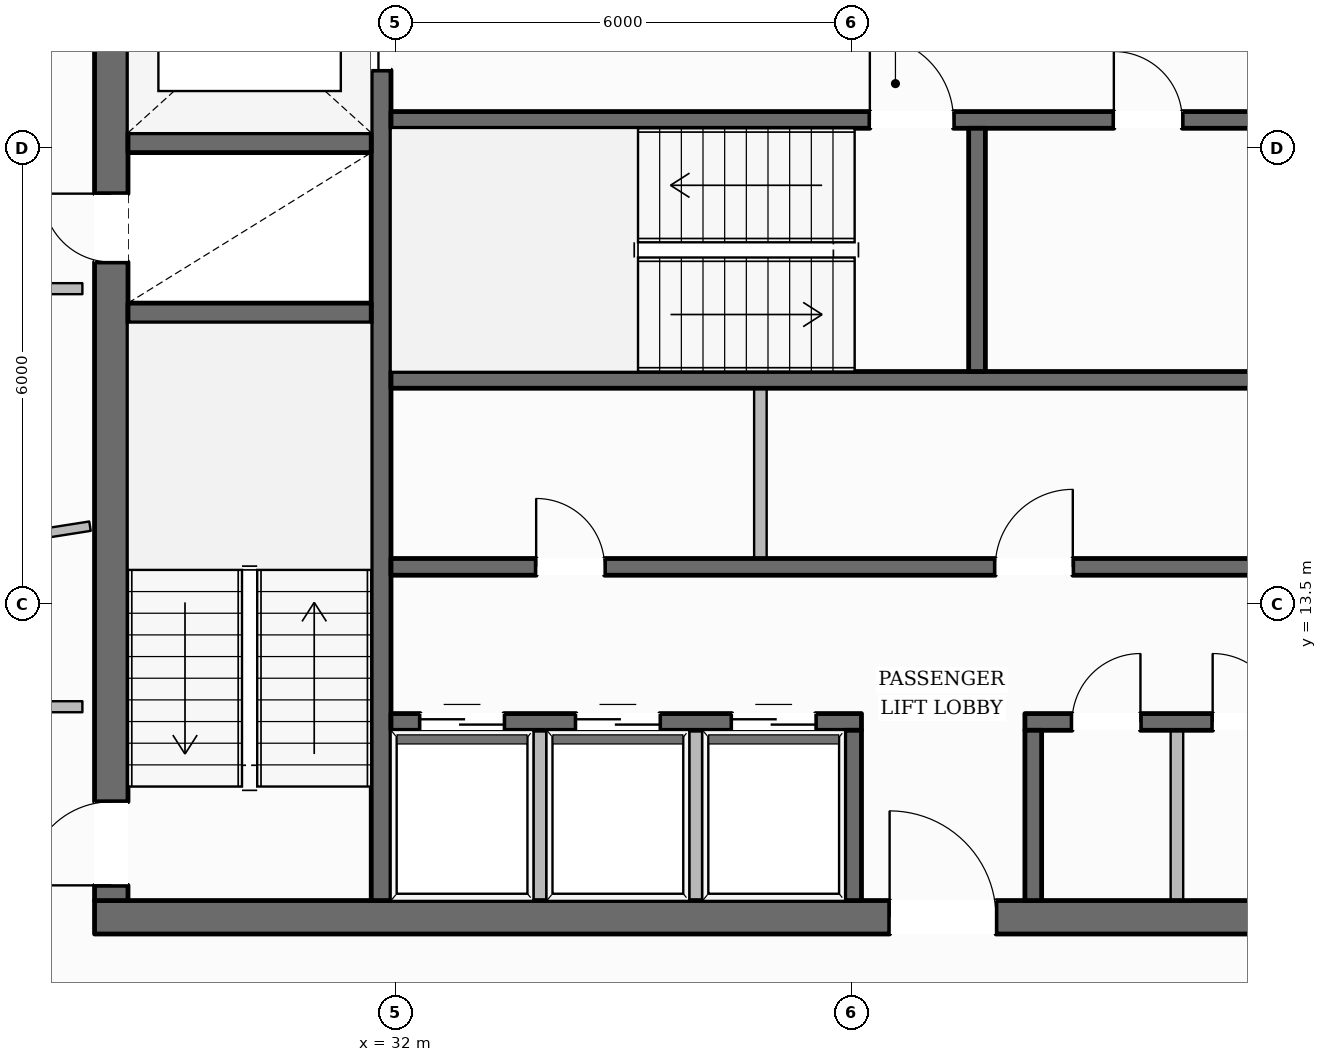
"""IFC4 building model, lengths in metres.
Left out: names, types, materials, properties, quantities, classifications, styles, units other than length and angle.
Written with IfcOpenShell. Run it as: python <this file> out.ifc"""

import sys

from ifc_helpers import new_model, si_unit, direction, frame, frame_2d, origin, place, context, subcontext, project, spatial, rectangle, extrude, element, fill, save


model = new_model("IFC4")
c1 = context("Model", 3, precision=1e-05, world=origin(), true_north=direction((0.0, 1.0)))
c2 = subcontext(c1, "Body", "Model", "MODEL_VIEW")
j1 = project(units=[si_unit("LENGTHUNIT", "METRE"), si_unit("PLANEANGLEUNIT", "RADIAN")], contexts=[c1])
p1 = place(None, origin())
s1 = spatial("IfcSite", under=j1, at=p1, CompositionType="ELEMENT")
p2 = place(p1, origin())
s2 = spatial("IfcBuilding", under=s1, at=p2, CompositionType="ELEMENT")
p3 = place(p2, frame((0.0, 0.0, 168.85)))
s3 = spatial("IfcBuildingStorey", under=s2, at=p3, CompositionType="ELEMENT", Elevation=168.85)
p4 = place(p3, frame((28.04, 9.38, 0.0), z_axis=(0.0, 0.0, 1.0), x_axis=(1.0, 0.0, 0.0)))
e1 = element("IfcWall", 1, at=p4, inside=s3, PredefinedType="SOLIDWALL", context=c2, shape_type="SweptSolid", body=[
    extrude(rectangle(XDim=19.92, YDim=0.44, at=frame_2d((9.96, 0.0))), origin(), (0.0, 0.0, 1.0), 3.6),
])
p5 = place(p4, frame((10.46, 0.0, 0.0)))
e2 = element("IfcOpeningElement", 2, at=p5, cuts=e1, PredefinedType="OPENING", context=c2, shape_type="SweptSolid", body=[
    extrude(rectangle(XDim=1.4, YDim=2.2, at=frame_2d((0.7, 1.1))), frame((0.0, 0.23, 0.0), z_axis=(0.0, -1.0, 0.0), x_axis=(1.0, 0.0, 0.0)), (0.0, 0.0, 1.0), 0.46),
])
p6 = place(p3, frame((28.26, 9.6, 0.0), z_axis=(0.0, 0.0, 1.0), x_axis=(0.0, 1.0, 0.0)))
e3 = element("IfcWall", 3, at=p6, inside=s3, PredefinedType="SOLIDWALL", context=c2, shape_type="SweptSolid", body=[
    extrude(rectangle(XDim=13.0, YDim=0.44, at=frame_2d((6.5, 0.0))), origin(), (0.0, 0.0, 1.0), 3.6),
])
p7 = place(p6, frame((0.2, 0.0, 0.0)))
e4 = element("IfcOpeningElement", 4, at=p7, cuts=e3, PredefinedType="OPENING", context=c2, shape_type="SweptSolid", body=[
    extrude(rectangle(XDim=1.1, YDim=2.15, at=frame_2d((0.55, 1.075))), frame((0.0, 0.23, 0.0), z_axis=(0.0, -1.0, 0.0), x_axis=(1.0, 0.0, 0.0)), (0.0, 0.0, 1.0), 0.46),
])
p8 = place(p6, frame((8.4, 0.0, 0.0)))
e5 = element("IfcOpeningElement", 5, at=p8, cuts=e3, PredefinedType="OPENING", context=c2, shape_type="SweptSolid", body=[
    extrude(rectangle(XDim=0.9, YDim=2.1, at=frame_2d((0.45, 1.05))), frame((0.0, 0.23, 0.0), z_axis=(0.0, -1.0, 0.0), x_axis=(1.0, 0.0, 0.0)), (0.0, 0.0, 1.0), 0.46),
])
p9 = place(p3, frame((31.81, 9.6, 0.0), z_axis=(0.0, 0.0, 1.0), x_axis=(0.0, 1.0, 0.0)))
e6 = element("IfcWall", 6, at=p9, inside=s3, PredefinedType="SHEAR", context=c2, shape_type="SweptSolid", body=[
    extrude(rectangle(XDim=13.0, YDim=0.26, at=frame_2d((6.5, 0.0))), origin(), (0.0, 0.0, 1.0), 3.6),
])
p10 = place(p9, frame((10.925, 0.0, 0.0)))
e7 = element("IfcOpeningElement", 7, at=p10, cuts=e6, PredefinedType="OPENING", context=c2, shape_type="SweptSolid", body=[
    extrude(rectangle(XDim=1.25, YDim=2.25, at=frame_2d((0.625, 1.125))), frame((0.0, 0.14, 0.0), z_axis=(0.0, -1.0, 0.0), x_axis=(1.0, 0.0, 0.0)), (0.0, 0.0, 1.0), 0.28),
])
for number, where, z_axis, x_axis in (
    (8, (28.48, 17.33, 0.0), (0.0, 0.0, 1.0), (1.0, 0.0, 0.0)),
    (9, (28.48, 19.57, 0.0), (0.0, 0.0, 1.0), (1.0, 0.0, 0.0)),
):
    element("IfcWall", number, at=place(p3, frame(where, z_axis=z_axis, x_axis=x_axis)), inside=s3, PredefinedType="SHEAR", context=c2, shape_type="SweptSolid", body=[
        extrude(rectangle(XDim=3.2, YDim=0.26, at=frame_2d((1.6, 0.0))), origin(), (0.0, 0.0, 1.0), 3.6),
    ])
p11 = place(p3, frame((31.94, 19.87, 0.0), z_axis=(0.0, 0.0, 1.0), x_axis=(1.0, 0.0, 0.0)))
e10 = element("IfcWall", 10, at=p11, inside=s3, PredefinedType="SOLIDWALL", context=c2, shape_type="SweptSolid", body=[
    extrude(rectangle(XDim=12.12, YDim=0.22, at=frame_2d((6.06, 0.0))), origin(), (0.0, 0.0, 1.0), 3.6),
])
p12 = place(p11, frame((6.3, 0.0, 0.0)))
e11 = element("IfcOpeningElement", 11, at=p12, cuts=e10, PredefinedType="OPENING", context=c2, shape_type="SweptSolid", body=[
    extrude(rectangle(XDim=1.1, YDim=2.15, at=frame_2d((0.55, 1.075))), frame((0.0, 0.12, 0.0), z_axis=(0.0, -1.0, 0.0), x_axis=(1.0, 0.0, 0.0)), (0.0, 0.0, 1.0), 0.24),
])
p13 = place(p11, frame((9.51, 0.0, 0.0)))
e12 = element("IfcOpeningElement", 12, at=p13, cuts=e10, PredefinedType="OPENING", context=c2, shape_type="SweptSolid", body=[
    extrude(rectangle(XDim=0.9, YDim=2.1, at=frame_2d((0.45, 1.05))), frame((0.0, 0.12, 0.0), z_axis=(0.0, -1.0, 0.0), x_axis=(1.0, 0.0, 0.0)), (0.0, 0.0, 1.0), 0.24),
])
p14 = place(p3, frame((31.94, 16.45, 0.0), z_axis=(0.0, 0.0, 1.0), x_axis=(1.0, 0.0, 0.0)))
e13 = element("IfcWall", 13, at=p14, inside=s3, PredefinedType="SOLIDWALL", context=c2, shape_type="SweptSolid", body=[
    extrude(rectangle(XDim=12.12, YDim=0.22, at=frame_2d((6.06, 0.0))), origin(), (0.0, 0.0, 1.0), 3.6),
])
p15 = place(p3, frame((39.65, 16.56, 0.0), z_axis=(0.0, 0.0, 1.0), x_axis=(0.0, 1.0, 0.0)))
e14 = element("IfcWall", 14, at=p15, inside=s3, PredefinedType="SOLIDWALL", context=c2, shape_type="SweptSolid", body=[
    extrude(rectangle(XDim=3.2, YDim=0.22, at=frame_2d((1.6, 0.0))), origin(), (0.0, 0.0, 1.0), 3.6),
])
p16 = place(p3, frame((31.94, 13.99, 0.0), z_axis=(0.0, 0.0, 1.0), x_axis=(1.0, 0.0, 0.0)))
e15 = element("IfcWall", 15, at=p16, inside=s3, PredefinedType="SOLIDWALL", context=c2, shape_type="SweptSolid", body=[
    extrude(rectangle(XDim=12.12, YDim=0.22, at=frame_2d((6.06, 0.0))), origin(), (0.0, 0.0, 1.0), 3.6),
])
p17 = place(p16, frame((1.91, 0.0, 0.0)))
e16 = element("IfcOpeningElement", 16, at=p17, cuts=e15, PredefinedType="OPENING", context=c2, shape_type="SweptSolid", body=[
    extrude(rectangle(XDim=0.9, YDim=2.1, at=frame_2d((0.45, 1.05))), frame((0.0, 0.12, 0.0), z_axis=(0.0, -1.0, 0.0), x_axis=(1.0, 0.0, 0.0)), (0.0, 0.0, 1.0), 0.24),
])
p18 = place(p16, frame((7.95, 0.0, 0.0)))
e17 = element("IfcOpeningElement", 17, at=p18, cuts=e15, PredefinedType="OPENING", context=c2, shape_type="SweptSolid", body=[
    extrude(rectangle(XDim=1.02, YDim=2.15, at=frame_2d((0.51, 1.075))), frame((0.0, 0.12, 0.0), z_axis=(0.0, -1.0, 0.0), x_axis=(1.0, 0.0, 0.0)), (0.0, 0.0, 1.0), 0.24),
])
p19 = place(p3, frame((31.94, 11.95, 0.0), z_axis=(0.0, 0.0, 1.0), x_axis=(1.0, 0.0, 0.0)))
e18 = element("IfcWall", 18, at=p19, inside=s3, PredefinedType="SOLIDWALL", context=c2, shape_type="SweptSolid", body=[
    extrude(rectangle(XDim=6.19, YDim=0.22, at=frame_2d((3.095, 0.0))), origin(), (0.0, 0.0, 1.0), 3.6),
])
p20 = place(p19, frame((0.385, 0.0, 0.0)))
e19 = element("IfcOpeningElement", 19, at=p20, cuts=e18, PredefinedType="OPENING", context=c2, shape_type="SweptSolid", body=[
    extrude(rectangle(XDim=1.1, YDim=2.2, at=frame_2d((0.55, 1.1))), frame((0.0, 0.12, 0.0), z_axis=(0.0, -1.0, 0.0), x_axis=(1.0, 0.0, 0.0)), (0.0, 0.0, 1.0), 0.24),
])
p21 = place(p19, frame((2.435, 0.0, 0.0)))
e20 = element("IfcOpeningElement", 20, at=p21, cuts=e18, PredefinedType="OPENING", context=c2, shape_type="SweptSolid", body=[
    extrude(rectangle(XDim=1.1, YDim=2.2, at=frame_2d((0.55, 1.1))), frame((0.0, 0.12, 0.0), z_axis=(0.0, -1.0, 0.0), x_axis=(1.0, 0.0, 0.0)), (0.0, 0.0, 1.0), 0.24),
])
p22 = place(p19, frame((4.485, 0.0, 0.0)))
e21 = element("IfcOpeningElement", 21, at=p22, cuts=e18, PredefinedType="OPENING", context=c2, shape_type="SweptSolid", body=[
    extrude(rectangle(XDim=1.1, YDim=2.2, at=frame_2d((0.55, 1.1))), frame((0.0, 0.12, 0.0), z_axis=(0.0, -1.0, 0.0), x_axis=(1.0, 0.0, 0.0)), (0.0, 0.0, 1.0), 0.24),
])
p23 = place(p3, frame((40.28, 11.95, 0.0), z_axis=(0.0, 0.0, 1.0), x_axis=(1.0, 0.0, 0.0)))
e22 = element("IfcWall", 22, at=p23, inside=s3, PredefinedType="SOLIDWALL", context=c2, shape_type="SweptSolid", body=[
    extrude(rectangle(XDim=3.78, YDim=0.22, at=frame_2d((1.89, 0.0))), origin(), (0.0, 0.0, 1.0), 3.6),
])
p24 = place(p23, frame((0.62, 0.0, 0.0)))
e23 = element("IfcOpeningElement", 23, at=p24, cuts=e22, PredefinedType="OPENING", context=c2, shape_type="SweptSolid", body=[
    extrude(rectangle(XDim=0.9, YDim=2.1, at=frame_2d((0.45, 1.05))), frame((0.0, 0.12, 0.0), z_axis=(0.0, -1.0, 0.0), x_axis=(1.0, 0.0, 0.0)), (0.0, 0.0, 1.0), 0.24),
])
p25 = place(p23, frame((2.47, 0.0, 0.0)))
e24 = element("IfcOpeningElement", 24, at=p25, cuts=e22, PredefinedType="OPENING", context=c2, shape_type="SweptSolid", body=[
    extrude(rectangle(XDim=0.9, YDim=2.1, at=frame_2d((0.45, 1.05))), frame((0.0, 0.12, 0.0), z_axis=(0.0, -1.0, 0.0), x_axis=(1.0, 0.0, 0.0)), (0.0, 0.0, 1.0), 0.24),
])
for number, where, z_axis, x_axis in (
    (25, (38.02, 9.6, 0.0), (0.0, 0.0, 1.0), (0.0, 1.0, 0.0)),
    (26, (40.39, 9.6, 0.0), (0.0, 0.0, 1.0), (0.0, 1.0, 0.0)),
):
    element("IfcWall", number, at=place(p3, frame(where, z_axis=z_axis, x_axis=x_axis)), inside=s3, PredefinedType="SOLIDWALL", context=c2, shape_type="SweptSolid", body=[
        extrude(rectangle(XDim=2.24, YDim=0.22, at=frame_2d((1.12, 0.0))), origin(), (0.0, 0.0, 1.0), 3.6),
    ])
p26 = place(p3, frame((15.072, 12.292, 0.0), z_axis=(0.0, 0.0, 1.0), x_axis=(0.492336574501, 0.870404904288, 0.0)))
e27 = element("IfcWall", 27, at=p26, inside=s3, PredefinedType="STANDARD", context=c2, shape_type="SweptSolid", body=[
    extrude(rectangle(XDim=37.15, YDim=0.35, at=frame_2d((18.575, 0.0))), origin(), (0.0, 0.0, 1.0), 3.132),
])
p27 = place(p26, frame((8.888, 0.0, 0.0)))
e28 = element("IfcOpeningElement", 28, at=p27, cuts=e27, PredefinedType="OPENING", context=c2, shape_type="SweptSolid", body=[
    extrude(rectangle(XDim=1.0, YDim=2.2, at=frame_2d((0.5, 1.1))), frame((0.0, 0.185, 0.0), z_axis=(0.0, -1.0, 0.0), x_axis=(1.0, 0.0, 0.0)), (0.0, 0.0, 1.0), 0.37),
])
p28 = place(p26, frame((32.928, 0.0, 0.65)))
e29 = element("IfcOpeningElement", 29, at=p28, cuts=e27, PredefinedType="OPENING", context=c2, shape_type="SweptSolid", body=[
    extrude(rectangle(XDim=1.45, YDim=1.75, at=frame_2d((0.725, 0.875))), frame((0.0, 0.185, 0.0), z_axis=(0.0, -1.0, 0.0), x_axis=(1.0, 0.0, 0.0)), (0.0, 0.0, 1.0), 0.37),
])
p29 = place(p26, frame((26.895, 0.0, 0.65)))
e30 = element("IfcOpeningElement", 30, at=p29, cuts=e27, PredefinedType="OPENING", context=c2, shape_type="SweptSolid", body=[
    extrude(rectangle(XDim=1.45, YDim=1.75, at=frame_2d((0.725, 0.875))), frame((0.0, 0.185, 0.0), z_axis=(0.0, -1.0, 0.0), x_axis=(1.0, 0.0, 0.0)), (0.0, 0.0, 1.0), 0.37),
])
p30 = place(p26, frame((20.862, 0.0, 0.65)))
e31 = element("IfcOpeningElement", 31, at=p30, cuts=e27, PredefinedType="OPENING", context=c2, shape_type="SweptSolid", body=[
    extrude(rectangle(XDim=1.45, YDim=1.75, at=frame_2d((0.725, 0.875))), frame((0.0, 0.185, 0.0), z_axis=(0.0, -1.0, 0.0), x_axis=(1.0, 0.0, 0.0)), (0.0, 0.0, 1.0), 0.37),
])
p31 = place(p26, frame((2.764, 0.0, 0.65)))
e32 = element("IfcOpeningElement", 32, at=p31, cuts=e27, PredefinedType="OPENING", context=c2, shape_type="SweptSolid", body=[
    extrude(rectangle(XDim=1.45, YDim=1.75, at=frame_2d((0.725, 0.875))), frame((0.0, 0.185, 0.0), z_axis=(0.0, -1.0, 0.0), x_axis=(1.0, 0.0, 0.0)), (0.0, 0.0, 1.0), 0.37),
])
p32 = place(p3, frame((42.696, 44.593, 0.0), z_axis=(0.0, 0.0, 1.0), x_axis=(0.495321099056, -0.868709968188, 0.0)))
e33 = element("IfcWall", 33, at=p32, inside=s3, PredefinedType="STANDARD", context=c2, shape_type="SweptSolid", body=[
    extrude(rectangle(XDim=37.366, YDim=0.35, at=frame_2d((18.683, 0.0))), origin(), (0.0, 0.0, 1.0), 3.132),
])
p33 = place(p32, frame((33.134, 0.0, 0.65)))
e34 = element("IfcOpeningElement", 34, at=p33, cuts=e33, PredefinedType="OPENING", context=c2, shape_type="SweptSolid", body=[
    extrude(rectangle(XDim=1.45, YDim=1.75, at=frame_2d((0.725, 0.875))), frame((0.0, 0.185, 0.0), z_axis=(0.0, -1.0, 0.0), x_axis=(1.0, 0.0, 0.0)), (0.0, 0.0, 1.0), 0.37),
])
p34 = place(p32, frame((27.065, 0.0, 0.65)))
e35 = element("IfcOpeningElement", 35, at=p34, cuts=e33, PredefinedType="OPENING", context=c2, shape_type="SweptSolid", body=[
    extrude(rectangle(XDim=1.45, YDim=1.75, at=frame_2d((0.725, 0.875))), frame((0.0, 0.185, 0.0), z_axis=(0.0, -1.0, 0.0), x_axis=(1.0, 0.0, 0.0)), (0.0, 0.0, 1.0), 0.37),
])
p35 = place(p32, frame((20.995, 0.0, 0.65)))
e36 = element("IfcOpeningElement", 36, at=p35, cuts=e33, PredefinedType="OPENING", context=c2, shape_type="SweptSolid", body=[
    extrude(rectangle(XDim=1.45, YDim=1.75, at=frame_2d((0.725, 0.875))), frame((0.0, 0.185, 0.0), z_axis=(0.0, -1.0, 0.0), x_axis=(1.0, 0.0, 0.0)), (0.0, 0.0, 1.0), 0.37),
])
p36 = place(p32, frame((8.857, 0.0, 0.65)))
e37 = element("IfcOpeningElement", 37, at=p36, cuts=e33, PredefinedType="OPENING", context=c2, shape_type="SweptSolid", body=[
    extrude(rectangle(XDim=1.45, YDim=1.75, at=frame_2d((0.725, 0.875))), frame((0.0, 0.185, 0.0), z_axis=(0.0, -1.0, 0.0), x_axis=(1.0, 0.0, 0.0)), (0.0, 0.0, 1.0), 0.37),
])
p37 = place(p32, frame((2.787, 0.0, 0.65)))
e38 = element("IfcOpeningElement", 38, at=p37, cuts=e33, PredefinedType="OPENING", context=c2, shape_type="SweptSolid", body=[
    extrude(rectangle(XDim=1.45, YDim=1.75, at=frame_2d((0.725, 0.875))), frame((0.0, 0.185, 0.0), z_axis=(0.0, -1.0, 0.0), x_axis=(1.0, 0.0, 0.0)), (0.0, 0.0, 1.0), 0.37),
])
for number, where, z_axis, x_axis in (
    (39, (33.9, 9.52, 0.0), (0.0, 0.0, 1.0), (0.0, 1.0, 0.0)),
    (40, (35.95, 9.52, 0.0), (0.0, 0.0, 1.0), (0.0, 1.0, 0.0)),
):
    element("IfcWall", number, at=place(p3, frame(where, z_axis=z_axis, x_axis=x_axis)), inside=s3, PredefinedType="PARTITIONING", context=c2, shape_type="SweptSolid", body=[
        extrude(rectangle(XDim=2.32, YDim=0.165, at=frame_2d((1.16, 0.0))), origin(), (0.0, 0.0, 1.0), 3.6),
    ])
p38 = place(p3, frame((36.8, 14.1, 0.0), z_axis=(0.0, 0.0, 1.0), x_axis=(0.0, 1.0, 0.0)))
e41 = element("IfcWall", 41, at=p38, inside=s3, PredefinedType="PARTITIONING", context=c2, shape_type="SweptSolid", body=[
    extrude(rectangle(XDim=2.24, YDim=0.165, at=frame_2d((1.12, 0.0))), origin(), (0.0, 0.0, 1.0), 3.6),
])
p39 = place(p3, frame((42.28, 9.52, 0.0), z_axis=(0.0, 0.0, 1.0), x_axis=(0.0, 1.0, 0.0)))
e42 = element("IfcWall", 42, at=p39, inside=s3, PredefinedType="PARTITIONING", context=c2, shape_type="SweptSolid", body=[
    extrude(rectangle(XDim=2.32, YDim=0.165, at=frame_2d((1.16, 0.0))), origin(), (0.0, 0.0, 1.0), 3.6),
])
p40 = place(p3, frame((27.88, 17.65, 0.0), z_axis=(0.0, 0.0, 1.0), x_axis=(-1.0, 0.0, 0.0)))
e43 = element("IfcWall", 43, at=p40, inside=s3, PredefinedType="PARTITIONING", context=c2, shape_type="SweptSolid", body=[
    extrude(rectangle(XDim=1.82, YDim=0.145, at=frame_2d((0.91, 0.0))), origin(), (0.0, 0.0, 1.0), 3.141),
])
p41 = place(p3, frame((26.06, 12.15, 0.0), z_axis=(0.0, 0.0, 1.0), x_axis=(1.0, 0.0, 0.0)))
e44 = element("IfcWall", 44, at=p41, inside=s3, PredefinedType="PARTITIONING", context=c2, shape_type="SweptSolid", body=[
    extrude(rectangle(XDim=1.82, YDim=0.145, at=frame_2d((0.91, 0.0))), origin(), (0.0, 0.0, 1.0), 3.6),
])
p42 = place(p3, frame((27.98, 14.525, 0.0), z_axis=(0.0, 0.0, 1.0), x_axis=(-0.987880348001, -0.155217325174, 0.0)))
e45 = element("IfcWall", 45, at=p42, inside=s3, PredefinedType="PARTITIONING", context=c2, shape_type="SweptSolid", body=[
    extrude(rectangle(XDim=12.281, YDim=0.125, at=frame_2d((6.141, 0.0))), origin(), (0.0, 0.0, 1.0), 3.141),
])
p43 = place(p42, frame((7.763, 0.0, 0.0)))
e46 = element("IfcOpeningElement", 46, at=p43, cuts=e45, PredefinedType="OPENING", context=c2, shape_type="SweptSolid", body=[
    extrude(rectangle(XDim=0.98, YDim=2.15, at=frame_2d((0.49, 1.075))), frame((0.0, 0.073, 0.0), z_axis=(0.0, -1.0, 0.0), x_axis=(1.0, 0.0, 0.0)), (0.0, 0.0, 1.0), 0.145),
])
p44 = place(p7, origin())
e47 = element("IfcDoor", 47, at=p44, inside=s3, OperationType="SINGLE_SWING_LEFT", PredefinedType="DOOR", context=c2, shape_type="SweptSolid", body=[
    extrude(rectangle(XDim=1.1, YDim=2.15, at=frame_2d((0.55, 1.075))), frame((0.0, 0.025, 0.0), z_axis=(0.0, -1.0, 0.0), x_axis=(1.0, 0.0, 0.0)), (0.0, 0.0, 1.0), 0.05),
])
fill(e4, e47)
p45 = place(p12, origin())
e48 = element("IfcDoor", 48, at=p45, inside=s3, OperationType="SINGLE_SWING_LEFT", PredefinedType="DOOR", context=c2, shape_type="SweptSolid", body=[
    extrude(rectangle(XDim=1.1, YDim=2.15, at=frame_2d((0.55, 1.075))), frame((0.0, 0.025, 0.0), z_axis=(0.0, -1.0, 0.0), x_axis=(1.0, 0.0, 0.0)), (0.0, 0.0, 1.0), 0.05),
])
fill(e11, e48)
p46 = place(p8, origin())
e49 = element("IfcDoor", 49, at=p46, inside=s3, OperationType="SINGLE_SWING_RIGHT", PredefinedType="DOOR", context=c2, shape_type="SweptSolid", body=[
    extrude(rectangle(XDim=0.9, YDim=2.1, at=frame_2d((0.45, 1.05))), frame((0.0, 0.025, 0.0), z_axis=(0.0, -1.0, 0.0), x_axis=(1.0, 0.0, 0.0)), (0.0, 0.0, 1.0), 0.05),
])
fill(e5, e49)
p47 = place(p10, origin())
e50 = element("IfcDoor", 50, at=p47, inside=s3, OperationType="DOUBLE_DOOR_SLIDING", PredefinedType="DOOR", context=c2, shape_type="SweptSolid", body=[
    extrude(rectangle(XDim=1.25, YDim=2.25, at=frame_2d((0.625, 1.125))), frame((0.0, 0.025, 0.0), z_axis=(0.0, -1.0, 0.0), x_axis=(1.0, 0.0, 0.0)), (0.0, 0.0, 1.0), 0.05),
])
fill(e7, e50)
p48 = place(p5, origin())
e51 = element("IfcDoor", 51, at=p48, inside=s3, OperationType="SINGLE_SWING_LEFT", PredefinedType="DOOR", context=c2, shape_type="SweptSolid", body=[
    extrude(rectangle(XDim=1.4, YDim=2.2, at=frame_2d((0.7, 1.1))), frame((0.0, 0.025, 0.0), z_axis=(0.0, -1.0, 0.0), x_axis=(1.0, 0.0, 0.0)), (0.0, 0.0, 1.0), 0.05),
])
fill(e2, e51)
p49 = place(p20, origin())
e52 = element("IfcDoor", 52, at=p49, inside=s3, OperationType="DOUBLE_DOOR_SLIDING", PredefinedType="DOOR", context=c2, shape_type="SweptSolid", body=[
    extrude(rectangle(XDim=1.1, YDim=2.2, at=frame_2d((0.55, 1.1))), frame((0.0, 0.025, 0.0), z_axis=(0.0, -1.0, 0.0), x_axis=(1.0, 0.0, 0.0)), (0.0, 0.0, 1.0), 0.05),
])
fill(e19, e52)
p50 = place(p21, origin())
e53 = element("IfcDoor", 53, at=p50, inside=s3, OperationType="DOUBLE_DOOR_SLIDING", PredefinedType="DOOR", context=c2, shape_type="SweptSolid", body=[
    extrude(rectangle(XDim=1.1, YDim=2.2, at=frame_2d((0.55, 1.1))), frame((0.0, 0.025, 0.0), z_axis=(0.0, -1.0, 0.0), x_axis=(1.0, 0.0, 0.0)), (0.0, 0.0, 1.0), 0.05),
])
fill(e20, e53)
p51 = place(p22, origin())
e54 = element("IfcDoor", 54, at=p51, inside=s3, OperationType="DOUBLE_DOOR_SLIDING", PredefinedType="DOOR", context=c2, shape_type="SweptSolid", body=[
    extrude(rectangle(XDim=1.1, YDim=2.2, at=frame_2d((0.55, 1.1))), frame((0.0, 0.025, 0.0), z_axis=(0.0, -1.0, 0.0), x_axis=(1.0, 0.0, 0.0)), (0.0, 0.0, 1.0), 0.05),
])
fill(e21, e54)
p52 = place(p17, origin())
e55 = element("IfcDoor", 55, at=p52, inside=s3, OperationType="SINGLE_SWING_LEFT", PredefinedType="DOOR", context=c2, shape_type="SweptSolid", body=[
    extrude(rectangle(XDim=0.9, YDim=2.1, at=frame_2d((0.45, 1.05))), frame((0.0, 0.025, 0.0), z_axis=(0.0, -1.0, 0.0), x_axis=(1.0, 0.0, 0.0)), (0.0, 0.0, 1.0), 0.05),
])
fill(e16, e55)
p53 = place(p18, origin())
e56 = element("IfcDoor", 56, at=p53, inside=s3, OperationType="SINGLE_SWING_RIGHT", PredefinedType="DOOR", context=c2, shape_type="SweptSolid", body=[
    extrude(rectangle(XDim=1.02, YDim=2.15, at=frame_2d((0.51, 1.075))), frame((0.0, 0.025, 0.0), z_axis=(0.0, -1.0, 0.0), x_axis=(1.0, 0.0, 0.0)), (0.0, 0.0, 1.0), 0.05),
])
fill(e17, e56)
p54 = place(p13, origin())
e57 = element("IfcDoor", 57, at=p54, inside=s3, OperationType="SINGLE_SWING_LEFT", PredefinedType="DOOR", context=c2, shape_type="SweptSolid", body=[
    extrude(rectangle(XDim=0.9, YDim=2.1, at=frame_2d((0.45, 1.05))), frame((0.0, 0.025, 0.0), z_axis=(0.0, -1.0, 0.0), x_axis=(1.0, 0.0, 0.0)), (0.0, 0.0, 1.0), 0.05),
])
fill(e12, e57)
p55 = place(p24, origin())
e58 = element("IfcDoor", 58, at=p55, inside=s3, OperationType="SINGLE_SWING_RIGHT", PredefinedType="DOOR", context=c2, shape_type="SweptSolid", body=[
    extrude(rectangle(XDim=0.9, YDim=2.1, at=frame_2d((0.45, 1.05))), frame((0.0, 0.025, 0.0), z_axis=(0.0, -1.0, 0.0), x_axis=(1.0, 0.0, 0.0)), (0.0, 0.0, 1.0), 0.05),
])
fill(e23, e58)
p56 = place(p25, origin())
e59 = element("IfcDoor", 59, at=p56, inside=s3, OperationType="SINGLE_SWING_LEFT", PredefinedType="DOOR", context=c2, shape_type="SweptSolid", body=[
    extrude(rectangle(XDim=0.9, YDim=2.1, at=frame_2d((0.45, 1.05))), frame((0.0, 0.025, 0.0), z_axis=(0.0, -1.0, 0.0), x_axis=(1.0, 0.0, 0.0)), (0.0, 0.0, 1.0), 0.05),
])
fill(e24, e59)
save(model, sys.argv[1])
